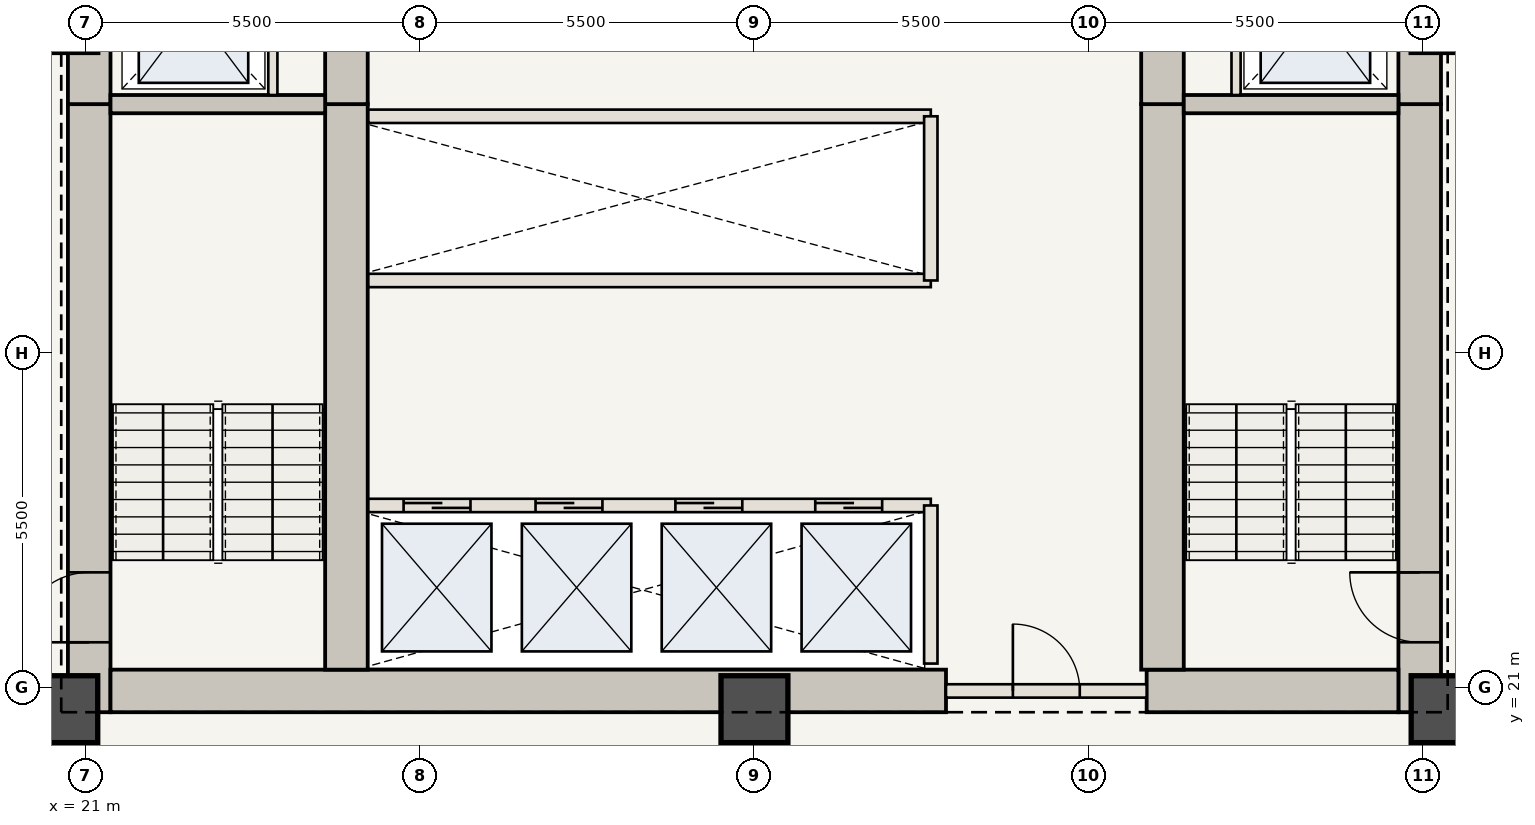
"""IFC4 building model, lengths in metres.
Left out: names, types, materials, properties, quantities, classifications, styles, units other than length and angle.
Written with IfcOpenShell. Run it as: python <this file> out.ifc"""

import sys

from ifc_helpers import new_model, si_unit, direction, frame, frame_2d, origin, origin_2d, place, context, subcontext, project, spatial, rectangle, extrude, element, fill, save


model = new_model("IFC4")
c1 = context("Model", 3, precision=1e-05, world=origin(), true_north=direction((0.0, 1.0)))
c2 = subcontext(c1, "Body", "Model", "MODEL_VIEW")
j1 = project(units=[si_unit("LENGTHUNIT", "METRE"), si_unit("PLANEANGLEUNIT", "RADIAN")], contexts=[c1])
p1 = place(None, origin())
s1 = spatial("IfcSite", under=j1, at=p1, CompositionType="ELEMENT")
p2 = place(p1, origin())
s2 = spatial("IfcBuilding", under=s1, at=p2, CompositionType="ELEMENT")
p3 = place(p2, frame((0.0, 0.0, 96.25)))
s3 = spatial("IfcBuildingStorey", under=s2, at=p3, CompositionType="ELEMENT", Elevation=96.25)
p4 = place(p3, frame((21.06, 20.6, 0.0), z_axis=(0.0, 0.0, 1.0), x_axis=(0.0, 1.0, 0.0)))
e1 = element("IfcWall", 1, at=p4, inside=s3, PredefinedType="SHEAR", context=c2, shape_type="SweptSolid", body=[
    extrude(rectangle(XDim=10.0, YDim=0.7, at=frame_2d((5.0, 0.0))), origin(), (0.0, 0.0, 1.0), 3.5),
])
p5 = place(p4, frame((1.15, 0.0, 0.0)))
e2 = element("IfcOpeningElement", 2, at=p5, cuts=e1, PredefinedType="OPENING", context=c2, shape_type="SweptSolid", body=[
    extrude(rectangle(XDim=1.15, YDim=2.15, at=frame_2d((0.575, 1.075))), frame((0.0, 0.36, 0.0), z_axis=(0.0, -1.0, 0.0), x_axis=(1.0, 0.0, 0.0)), (0.0, 0.0, 1.0), 0.72),
])
p6 = place(p3, frame((21.06, 30.6, 0.0), z_axis=(0.0, 0.0, 1.0), x_axis=(0.0, 1.0, 0.0)))
e3 = element("IfcWall", 3, at=p6, inside=s3, PredefinedType="SHEAR", context=c2, shape_type="SweptSolid", body=[
    extrude(rectangle(XDim=12.75, YDim=0.7, at=frame_2d((6.375, 0.0))), origin(), (0.0, 0.0, 1.0), 3.5),
])
p7 = place(p6, frame((4.2, 0.0, 0.0)))
e4 = element("IfcOpeningElement", 4, at=p7, cuts=e3, PredefinedType="OPENING", context=c2, shape_type="SweptSolid", body=[
    extrude(rectangle(XDim=1.1, YDim=2.15, at=frame_2d((0.55, 1.075))), frame((0.0, 0.36, 0.0), z_axis=(0.0, -1.0, 0.0), x_axis=(1.0, 0.0, 0.0)), (0.0, 0.0, 1.0), 0.72),
])
p8 = place(p6, frame((9.2, 0.0, 0.0)))
e5 = element("IfcOpeningElement", 5, at=p8, cuts=e3, PredefinedType="OPENING", context=c2, shape_type="SweptSolid", body=[
    extrude(rectangle(XDim=0.92, YDim=2.1, at=frame_2d((0.46, 1.05))), frame((0.0, 0.36, 0.0), z_axis=(0.0, -1.0, 0.0), x_axis=(1.0, 0.0, 0.0)), (0.0, 0.0, 1.0), 0.72),
])
p9 = place(p3, frame((42.94, 20.6, 0.0), z_axis=(0.0, 0.0, 1.0), x_axis=(0.0, 1.0, 0.0)))
e6 = element("IfcWall", 6, at=p9, inside=s3, PredefinedType="SHEAR", context=c2, shape_type="SweptSolid", body=[
    extrude(rectangle(XDim=10.0, YDim=0.7, at=frame_2d((5.0, 0.0))), origin(), (0.0, 0.0, 1.0), 3.5),
])
p10 = place(p9, frame((1.15, 0.0, 0.0)))
e7 = element("IfcOpeningElement", 7, at=p10, cuts=e6, PredefinedType="OPENING", context=c2, shape_type="SweptSolid", body=[
    extrude(rectangle(XDim=1.15, YDim=2.15, at=frame_2d((0.575, 1.075))), frame((0.0, 0.36, 0.0), z_axis=(0.0, -1.0, 0.0), x_axis=(1.0, 0.0, 0.0)), (0.0, 0.0, 1.0), 0.72),
])
p11 = place(p3, frame((42.94, 30.6, 0.0), z_axis=(0.0, 0.0, 1.0), x_axis=(0.0, 1.0, 0.0)))
e8 = element("IfcWall", 8, at=p11, inside=s3, PredefinedType="SHEAR", context=c2, shape_type="SweptSolid", body=[
    extrude(rectangle(XDim=12.75, YDim=0.7, at=frame_2d((6.375, 0.0))), origin(), (0.0, 0.0, 1.0), 3.5),
])
p12 = place(p11, frame((4.2, 0.0, 0.0)))
e9 = element("IfcOpeningElement", 9, at=p12, cuts=e8, PredefinedType="OPENING", context=c2, shape_type="SweptSolid", body=[
    extrude(rectangle(XDim=1.1, YDim=2.15, at=frame_2d((0.55, 1.075))), frame((0.0, 0.36, 0.0), z_axis=(0.0, -1.0, 0.0), x_axis=(1.0, 0.0, 0.0)), (0.0, 0.0, 1.0), 0.72),
])
p13 = place(p11, frame((8.05, 0.0, 0.0)))
e10 = element("IfcOpeningElement", 10, at=p13, cuts=e8, PredefinedType="OPENING", context=c2, shape_type="SweptSolid", body=[
    extrude(rectangle(XDim=0.88, YDim=2.1, at=frame_2d((0.44, 1.05))), frame((0.0, 0.36, 0.0), z_axis=(0.0, -1.0, 0.0), x_axis=(1.0, 0.0, 0.0)), (0.0, 0.0, 1.0), 0.72),
])
p14 = place(p11, frame((9.45, 0.0, 0.0)))
e11 = element("IfcOpeningElement", 11, at=p14, cuts=e8, PredefinedType="OPENING", context=c2, shape_type="SweptSolid", body=[
    extrude(rectangle(XDim=0.88, YDim=2.1, at=frame_2d((0.44, 1.05))), frame((0.0, 0.36, 0.0), z_axis=(0.0, -1.0, 0.0), x_axis=(1.0, 0.0, 0.0)), (0.0, 0.0, 1.0), 0.72),
])
p15 = place(p11, frame((10.85, 0.0, 0.0)))
e12 = element("IfcOpeningElement", 12, at=p15, cuts=e8, PredefinedType="OPENING", context=c2, shape_type="SweptSolid", body=[
    extrude(rectangle(XDim=0.88, YDim=2.1, at=frame_2d((0.44, 1.05))), frame((0.0, 0.36, 0.0), z_axis=(0.0, -1.0, 0.0), x_axis=(1.0, 0.0, 0.0)), (0.0, 0.0, 1.0), 0.72),
])
p16 = place(p3, frame((21.41, 20.95, 0.0), z_axis=(0.0, 0.0, 1.0), x_axis=(1.0, 0.0, 0.0)))
e13 = element("IfcWall", 13, at=p16, inside=s3, PredefinedType="SHEAR", context=c2, shape_type="SweptSolid", body=[
    extrude(rectangle(XDim=13.74, YDim=0.7, at=frame_2d((6.87, 0.0))), origin(), (0.0, 0.0, 1.0), 3.5),
])
p17 = place(p3, frame((38.45, 20.95, 0.0), z_axis=(0.0, 0.0, 1.0), x_axis=(1.0, 0.0, 0.0)))
e14 = element("IfcWall", 14, at=p17, inside=s3, PredefinedType="SHEAR", context=c2, shape_type="SweptSolid", body=[
    extrude(rectangle(XDim=4.14, YDim=0.7, at=frame_2d((2.07, 0.0))), origin(), (0.0, 0.0, 1.0), 3.5),
])
p18 = place(p3, frame((25.29, 21.3, 0.0), z_axis=(0.0, 0.0, 1.0), x_axis=(0.0, 1.0, 0.0)))
e15 = element("IfcWall", 15, at=p18, inside=s3, PredefinedType="SHEAR", context=c2, shape_type="SweptSolid", body=[
    extrude(rectangle(XDim=9.3, YDim=0.7, at=frame_2d((4.65, 0.0))), origin(), (0.0, 0.0, 1.0), 3.5),
])
p19 = place(p3, frame((25.29, 30.6, 0.0), z_axis=(0.0, 0.0, 1.0), x_axis=(0.0, 1.0, 0.0)))
e16 = element("IfcWall", 16, at=p19, inside=s3, PredefinedType="SHEAR", context=c2, shape_type="SweptSolid", body=[
    extrude(rectangle(XDim=12.05, YDim=0.7, at=frame_2d((6.025, 0.0))), origin(), (0.0, 0.0, 1.0), 3.5),
])
p20 = place(p19, frame((6.25, 0.0, 0.0)))
e17 = element("IfcOpeningElement", 17, at=p20, cuts=e16, PredefinedType="OPENING", context=c2, shape_type="SweptSolid", body=[
    extrude(rectangle(XDim=1.1, YDim=2.15, at=frame_2d((0.55, 1.075))), frame((0.0, 0.36, 0.0), z_axis=(0.0, -1.0, 0.0), x_axis=(1.0, 0.0, 0.0)), (0.0, 0.0, 1.0), 0.72),
])
p21 = place(p3, frame((38.71, 21.3, 0.0), z_axis=(0.0, 0.0, 1.0), x_axis=(0.0, 1.0, 0.0)))
e18 = element("IfcWall", 18, at=p21, inside=s3, PredefinedType="SHEAR", context=c2, shape_type="SweptSolid", body=[
    extrude(rectangle(XDim=9.3, YDim=0.7, at=frame_2d((4.65, 0.0))), origin(), (0.0, 0.0, 1.0), 3.5),
])
p22 = place(p3, frame((38.71, 30.6, 0.0), z_axis=(0.0, 0.0, 1.0), x_axis=(0.0, 1.0, 0.0)))
e19 = element("IfcWall", 19, at=p22, inside=s3, PredefinedType="SHEAR", context=c2, shape_type="SweptSolid", body=[
    extrude(rectangle(XDim=12.05, YDim=0.7, at=frame_2d((6.025, 0.0))), origin(), (0.0, 0.0, 1.0), 3.5),
])
for number, where, z_axis, x_axis in (
    (20, (20.65, 20.65, 0.0), (0.0, 0.0, 1.0), (1.0, 0.0, 0.0)),
    (21, (32.0, 20.65, 0.0), (0.0, 0.0, 1.0), (1.0, 0.0, 0.0)),
    (22, (43.35, 20.65, 0.0), (0.0, 0.0, 1.0), (1.0, 0.0, 0.0)),
):
    element("IfcColumn", number, at=place(p3, frame(where, z_axis=z_axis, x_axis=x_axis)), inside=s3, PredefinedType="COLUMN", context=c2, shape_type="SweptSolid", body=[
        extrude(rectangle(XDim=1.1, YDim=1.1, at=origin_2d()), origin(), (0.0, 0.0, 1.0), 3.5),
    ])
for number, where, z_axis, x_axis in (
    (23, (21.41, 30.6, 0.0), (0.0, 0.0, 1.0), (1.0, 0.0, 0.0)),
    (24, (39.06, 30.6, 0.0), (0.0, 0.0, 1.0), (1.0, 0.0, 0.0)),
):
    element("IfcWall", number, at=place(p3, frame(where, z_axis=z_axis, x_axis=x_axis)), inside=s3, PredefinedType="SHEAR", context=c2, shape_type="SweptSolid", body=[
        extrude(rectangle(XDim=3.53, YDim=0.3, at=frame_2d((1.765, 0.0))), origin(), (0.0, 0.0, 1.0), 3.08),
    ])
for number, where, z_axis, x_axis in (
    (25, (24.08, 30.75, 0.0), (0.0, 0.0, 1.0), (0.0, 1.0, 0.0)),
    (26, (39.92, 30.75, 0.0), (0.0, 0.0, 1.0), (0.0, 1.0, 0.0)),
):
    element("IfcWall", number, at=place(p3, frame(where, z_axis=z_axis, x_axis=x_axis)), inside=s3, PredefinedType="STANDARD", context=c2, shape_type="SweptSolid", body=[
        extrude(rectangle(XDim=2.65, YDim=0.15, at=frame_2d((1.325, 0.0))), origin(), (0.0, 0.0, 1.0), 3.08),
    ])
p23 = place(p3, frame((35.15, 20.95, 0.0), z_axis=(0.0, 0.0, 1.0), x_axis=(1.0, 0.0, 0.0)))
e27 = element("IfcWall", 27, at=p23, inside=s3, PredefinedType="STANDARD", context=c2, shape_type="SweptSolid", body=[
    extrude(rectangle(XDim=3.3, YDim=0.22, at=frame_2d((1.65, 0.0))), origin(), (0.0, 0.0, 1.0), 3.08),
])
p24 = place(p23, frame((1.1, 0.0, 0.0)))
e28 = element("IfcOpeningElement", 28, at=p24, cuts=e27, PredefinedType="OPENING", context=c2, shape_type="SweptSolid", body=[
    extrude(rectangle(XDim=1.1, YDim=2.15, at=frame_2d((0.55, 1.075))), frame((0.0, 0.12, 0.0), z_axis=(0.0, -1.0, 0.0), x_axis=(1.0, 0.0, 0.0)), (0.0, 0.0, 1.0), 0.24),
])
p25 = place(p3, frame((25.65, 24.0, 0.0), z_axis=(0.0, 0.0, 1.0), x_axis=(1.0, 0.0, 0.0)))
e29 = element("IfcWall", 29, at=p25, inside=s3, PredefinedType="STANDARD", context=c2, shape_type="SweptSolid", body=[
    extrude(rectangle(XDim=9.25, YDim=0.22, at=frame_2d((4.625, 0.0))), origin(), (0.0, 0.0, 1.0), 3.08),
])
p26 = place(p25, frame((0.58, 0.0, 0.0)))
e30 = element("IfcOpeningElement", 30, at=p26, cuts=e29, PredefinedType="OPENING", context=c2, shape_type="SweptSolid", body=[
    extrude(rectangle(XDim=1.1, YDim=2.15, at=frame_2d((0.55, 1.075))), frame((0.0, 0.12, 0.0), z_axis=(0.0, -1.0, 0.0), x_axis=(1.0, 0.0, 0.0)), (0.0, 0.0, 1.0), 0.24),
])
p27 = place(p25, frame((2.75, 0.0, 0.0)))
e31 = element("IfcOpeningElement", 31, at=p27, cuts=e29, PredefinedType="OPENING", context=c2, shape_type="SweptSolid", body=[
    extrude(rectangle(XDim=1.1, YDim=2.15, at=frame_2d((0.55, 1.075))), frame((0.0, 0.12, 0.0), z_axis=(0.0, -1.0, 0.0), x_axis=(1.0, 0.0, 0.0)), (0.0, 0.0, 1.0), 0.24),
])
p28 = place(p25, frame((5.05, 0.0, 0.0)))
e32 = element("IfcOpeningElement", 32, at=p28, cuts=e29, PredefinedType="OPENING", context=c2, shape_type="SweptSolid", body=[
    extrude(rectangle(XDim=1.1, YDim=2.15, at=frame_2d((0.55, 1.075))), frame((0.0, 0.12, 0.0), z_axis=(0.0, -1.0, 0.0), x_axis=(1.0, 0.0, 0.0)), (0.0, 0.0, 1.0), 0.24),
])
p29 = place(p25, frame((7.35, 0.0, 0.0)))
e33 = element("IfcOpeningElement", 33, at=p29, cuts=e29, PredefinedType="OPENING", context=c2, shape_type="SweptSolid", body=[
    extrude(rectangle(XDim=1.1, YDim=2.15, at=frame_2d((0.55, 1.075))), frame((0.0, 0.12, 0.0), z_axis=(0.0, -1.0, 0.0), x_axis=(1.0, 0.0, 0.0)), (0.0, 0.0, 1.0), 0.24),
])
p30 = place(p3, frame((34.9, 21.4, 0.0), z_axis=(0.0, 0.0, 1.0), x_axis=(0.0, 1.0, 0.0)))
e34 = element("IfcWall", 34, at=p30, inside=s3, PredefinedType="STANDARD", context=c2, shape_type="SweptSolid", body=[
    extrude(rectangle(XDim=2.6, YDim=0.22, at=frame_2d((1.3, 0.0))), origin(), (0.0, 0.0, 1.0), 3.08),
])
for number, where, z_axis, x_axis in (
    (35, (25.65, 27.7, 0.0), (0.0, 0.0, 1.0), (1.0, 0.0, 0.0)),
    (36, (25.65, 30.4, 0.0), (0.0, 0.0, 1.0), (1.0, 0.0, 0.0)),
):
    element("IfcWall", number, at=place(p3, frame(where, z_axis=z_axis, x_axis=x_axis)), inside=s3, PredefinedType="STANDARD", context=c2, shape_type="SweptSolid", body=[
        extrude(rectangle(XDim=9.25, YDim=0.22, at=frame_2d((4.625, 0.0))), origin(), (0.0, 0.0, 1.0), 3.08),
    ])
p31 = place(p3, frame((34.9, 27.7, 0.0), z_axis=(0.0, 0.0, 1.0), x_axis=(0.0, 1.0, 0.0)))
e37 = element("IfcWall", 37, at=p31, inside=s3, PredefinedType="STANDARD", context=c2, shape_type="SweptSolid", body=[
    extrude(rectangle(XDim=2.7, YDim=0.22, at=frame_2d((1.35, 0.0))), origin(), (0.0, 0.0, 1.0), 3.08),
])
p32 = place(p5, origin())
e38 = element("IfcDoor", 38, at=p32, inside=s3, OperationType="SINGLE_SWING_LEFT", PredefinedType="DOOR", context=c2, shape_type="SweptSolid", body=[
    extrude(rectangle(XDim=1.15, YDim=2.15, at=frame_2d((0.575, 1.075))), frame((0.0, 0.025, 0.0), z_axis=(0.0, -1.0, 0.0), x_axis=(1.0, 0.0, 0.0)), (0.0, 0.0, 1.0), 0.05),
])
fill(e2, e38)
p33 = place(p10, origin())
e39 = element("IfcDoor", 39, at=p33, inside=s3, OperationType="SINGLE_SWING_RIGHT", PredefinedType="DOOR", context=c2, shape_type="SweptSolid", body=[
    extrude(rectangle(XDim=1.15, YDim=2.15, at=frame_2d((0.575, 1.075))), frame((0.0, 0.025, 0.0), z_axis=(0.0, -1.0, 0.0), x_axis=(1.0, 0.0, 0.0)), (0.0, 0.0, 1.0), 0.05),
])
fill(e7, e39)
p34 = place(p24, origin())
e40 = element("IfcDoor", 40, at=p34, inside=s3, OperationType="SINGLE_SWING_LEFT", PredefinedType="DOOR", context=c2, shape_type="SweptSolid", body=[
    extrude(rectangle(XDim=1.1, YDim=2.15, at=frame_2d((0.55, 1.075))), frame((0.0, 0.025, 0.0), z_axis=(0.0, -1.0, 0.0), x_axis=(1.0, 0.0, 0.0)), (0.0, 0.0, 1.0), 0.05),
])
fill(e28, e40)
p35 = place(p26, origin())
e41 = element("IfcDoor", 41, at=p35, inside=s3, OperationType="DOUBLE_DOOR_SLIDING", PredefinedType="DOOR", context=c2, shape_type="SweptSolid", body=[
    extrude(rectangle(XDim=1.1, YDim=2.15, at=frame_2d((0.55, 1.075))), frame((0.0, 0.025, 0.0), z_axis=(0.0, -1.0, 0.0), x_axis=(1.0, 0.0, 0.0)), (0.0, 0.0, 1.0), 0.05),
])
fill(e30, e41)
p36 = place(p27, origin())
e42 = element("IfcDoor", 42, at=p36, inside=s3, OperationType="DOUBLE_DOOR_SLIDING", PredefinedType="DOOR", context=c2, shape_type="SweptSolid", body=[
    extrude(rectangle(XDim=1.1, YDim=2.15, at=frame_2d((0.55, 1.075))), frame((0.0, 0.025, 0.0), z_axis=(0.0, -1.0, 0.0), x_axis=(1.0, 0.0, 0.0)), (0.0, 0.0, 1.0), 0.05),
])
fill(e31, e42)
p37 = place(p28, origin())
e43 = element("IfcDoor", 43, at=p37, inside=s3, OperationType="DOUBLE_DOOR_SLIDING", PredefinedType="DOOR", context=c2, shape_type="SweptSolid", body=[
    extrude(rectangle(XDim=1.1, YDim=2.15, at=frame_2d((0.55, 1.075))), frame((0.0, 0.025, 0.0), z_axis=(0.0, -1.0, 0.0), x_axis=(1.0, 0.0, 0.0)), (0.0, 0.0, 1.0), 0.05),
])
fill(e32, e43)
p38 = place(p29, origin())
e44 = element("IfcDoor", 44, at=p38, inside=s3, OperationType="DOUBLE_DOOR_SLIDING", PredefinedType="DOOR", context=c2, shape_type="SweptSolid", body=[
    extrude(rectangle(XDim=1.1, YDim=2.15, at=frame_2d((0.55, 1.075))), frame((0.0, 0.025, 0.0), z_axis=(0.0, -1.0, 0.0), x_axis=(1.0, 0.0, 0.0)), (0.0, 0.0, 1.0), 0.05),
])
fill(e33, e44)
save(model, sys.argv[1])
